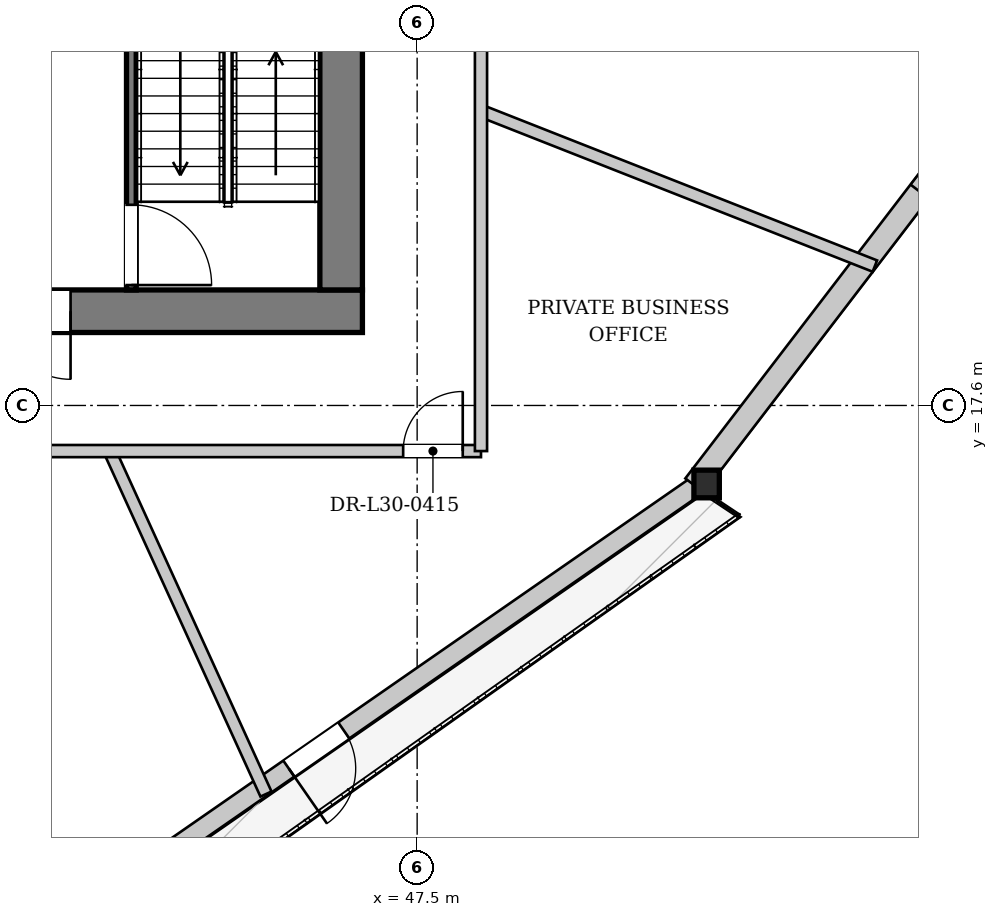
"""IFC4 building model, lengths in metres.
Left out: names, types, materials, properties, quantities, classifications, styles, units other than length and angle.
Written with IfcOpenShell. Run it as: python <this file> out.ifc"""

import sys

from ifc_helpers import new_model, si_unit, direction, frame, frame_2d, origin, origin_2d, place, context, subcontext, project, spatial, rectangle, i_section, extrude, source, transform, mapped, element, fill, save


model = new_model("IFC4")
c1 = context("Model", 3, precision=1e-05, world=origin(), true_north=direction((0.0, 1.0)))
c2 = subcontext(c1, "Body", "Model", "MODEL_VIEW")
j1 = project(units=[si_unit("LENGTHUNIT", "METRE"), si_unit("PLANEANGLEUNIT", "RADIAN")], contexts=[c1])
p1 = place(None, origin())
s1 = spatial("IfcSite", under=j1, at=p1, CompositionType="ELEMENT")
p2 = place(p1, origin())
s2 = spatial("IfcBuilding", under=s1, at=p2, CompositionType="ELEMENT")
p3 = place(p2, frame((0.0, 0.0, 116.35)))
s3 = spatial("IfcBuildingStorey", under=s2, at=p3, CompositionType="ELEMENT", Elevation=116.35)
m1 = source(origin(), c2, "Body", "SweptSolid", [
    extrude(i_section(OverallWidth=0.418, OverallDepth=0.455, WebThickness=0.038, FlangeThickness=0.059, at=origin_2d()), origin(), (0.0, 0.0, 1.0), 3.398),
])
p4 = place(p3, frame((52.212, 16.169, 0.0), z_axis=(0.02845253768, 0.08233991965, 0.996198068022), x_axis=(-0.945162434362, 0.326600631769, 0.0)))
e1 = element("IfcColumn", 1, at=p4, inside=s3, PredefinedType="COLUMN", context=c2, shape_type="MappedRepresentation", body=[
    mapped(m1, transform((0.0, 0.0, 0.0), x_axis=(1.0, 0.0, 0.0), y_axis=(0.0, 1.0, 0.0), z_axis=(0.0, 0.0, 1.0), scale=1.0)),
])
p5 = place(p3, frame((52.121, 16.301, 0.0), z_axis=(0.0, 0.0, 1.0), x_axis=(-0.821520503946, -0.570178973303, 0.0)))
e2 = element("IfcWall", 2, at=p5, inside=s3, PredefinedType="SOLIDWALL", context=c2, shape_type="SweptSolid", body=[
    extrude(rectangle(XDim=23.887, YDim=0.32, at=frame_2d((11.944, 0.0))), origin(), (0.0, 0.0, 1.0), 2.692),
])
p6 = place(p5, frame((7.094, 0.0, 0.0)))
e3 = element("IfcOpeningElement", 3, at=p6, cuts=e2, PredefinedType="OPENING", context=c2, shape_type="SweptSolid", body=[
    extrude(rectangle(XDim=1.1, YDim=2.3, at=frame_2d((0.55, 1.15))), frame((0.0, 0.17, 0.0), z_axis=(0.0, -1.0, 0.0), x_axis=(1.0, 0.0, 0.0)), (0.0, 0.0, 1.0), 0.34),
])
p7 = place(p5, frame((16.777, 0.0, 0.372)))
e4 = element("IfcOpeningElement", 4, at=p7, cuts=e2, PredefinedType="OPENING", context=c2, shape_type="SweptSolid", body=[
    extrude(rectangle(XDim=1.8, YDim=2.2, at=frame_2d((0.9, 1.1))), frame((0.0, 0.17, 0.0), z_axis=(0.0, -1.0, 0.0), x_axis=(1.0, 0.0, 0.0)), (0.0, 0.0, 1.0), 0.34),
])
p8 = place(p3, frame((66.591, 35.245, 0.0), z_axis=(0.0, 0.0, 1.0), x_axis=(-0.608252150968, -0.7937438635, 0.0)))
e5 = element("IfcWall", 5, at=p8, inside=s3, PredefinedType="SOLIDWALL", context=c2, shape_type="SweptSolid", body=[
    extrude(rectangle(XDim=23.887, YDim=0.38, at=frame_2d((11.944, 0.0))), origin(), (0.0, 0.0, 1.0), 2.692),
])
p9 = place(p8, frame((6.088, 0.0, 0.65)))
e6 = element("IfcOpeningElement", 6, at=p9, cuts=e5, PredefinedType="OPENING", context=c2, shape_type="SweptSolid", body=[
    extrude(rectangle(XDim=1.2, YDim=1.5, at=frame_2d((0.6, 0.75))), frame((0.0, 0.2, 0.0), z_axis=(0.0, -1.0, 0.0), x_axis=(1.0, 0.0, 0.0)), (0.0, 0.0, 1.0), 0.4),
])
p10 = place(p8, frame((16.599, 0.0, 0.65)))
e7 = element("IfcOpeningElement", 7, at=p10, cuts=e5, PredefinedType="OPENING", context=c2, shape_type="SweptSolid", body=[
    extrude(rectangle(XDim=1.2, YDim=1.5, at=frame_2d((0.6, 0.75))), frame((0.0, 0.2, 0.0), z_axis=(0.0, -1.0, 0.0), x_axis=(1.0, 0.0, 0.0)), (0.0, 0.0, 1.0), 0.4),
])
p11 = place(p3, frame((46.6, 19.15, 0.0), z_axis=(0.0, 0.0, 1.0), x_axis=(-1.0, 0.0, 0.0)))
e8 = element("IfcWall", 8, at=p11, inside=s3, PredefinedType="SHEAR", context=c2, shape_type="SweptSolid", body=[
    extrude(rectangle(XDim=17.2, YDim=0.7, at=frame_2d((8.6, 0.0))), origin(), (0.0, 0.0, 1.0), 3.3),
])
p12 = place(p11, frame((4.8, 0.0, 0.0)))
e9 = element("IfcOpeningElement", 9, at=p12, cuts=e8, PredefinedType="OPENING", context=c2, shape_type="SweptSolid", body=[
    extrude(rectangle(XDim=1.12, YDim=2.25, at=frame_2d((0.56, 1.125))), frame((0.0, 0.36, 0.0), z_axis=(0.0, -1.0, 0.0), x_axis=(1.0, 0.0, 0.0)), (0.0, 0.0, 1.0), 0.72),
])
p13 = place(p11, frame((11.3, 0.0, 0.0)))
e10 = element("IfcOpeningElement", 10, at=p13, cuts=e8, PredefinedType="OPENING", context=c2, shape_type="SweptSolid", body=[
    extrude(rectangle(XDim=1.12, YDim=2.25, at=frame_2d((0.56, 1.125))), frame((0.0, 0.36, 0.0), z_axis=(0.0, -1.0, 0.0), x_axis=(1.0, 0.0, 0.0)), (0.0, 0.0, 1.0), 0.72),
])
p14 = place(p3, frame((46.25, 33.7, 0.0), z_axis=(0.0, 0.0, 1.0), x_axis=(0.0, -1.0, 0.0)))
e11 = element("IfcWall", 11, at=p14, inside=s3, PredefinedType="SHEAR", context=c2, shape_type="SweptSolid", body=[
    extrude(rectangle(XDim=14.2, YDim=0.7, at=frame_2d((7.1, 0.0))), origin(), (0.0, 0.0, 1.0), 3.3),
])
p15 = place(p14, frame((5.18, 0.0, 0.0)))
e12 = element("IfcOpeningElement", 12, at=p15, cuts=e11, PredefinedType="OPENING", context=c2, shape_type="SweptSolid", body=[
    extrude(rectangle(XDim=1.6, YDim=2.2, at=frame_2d((0.8, 1.1))), frame((0.0, 0.36, 0.0), z_axis=(0.0, -1.0, 0.0), x_axis=(1.0, 0.0, 0.0)), (0.0, 0.0, 1.0), 0.72),
])
p16 = place(p3, frame((42.8, 26.96, 0.0), z_axis=(0.0, 0.0, 1.0), x_axis=(0.0, -1.0, 0.0)))
e13 = element("IfcWall", 13, at=p16, inside=s3, PredefinedType="PARTITIONING", context=c2, shape_type="SweptSolid", body=[
    extrude(rectangle(XDim=7.46, YDim=0.16, at=frame_2d((3.73, 0.0))), origin(), (0.0, 0.0, 1.0), 3.3),
])
p17 = place(p16, frame((6.06, 0.0, 0.0)))
e14 = element("IfcOpeningElement", 14, at=p17, cuts=e13, PredefinedType="OPENING", context=c2, shape_type="SweptSolid", body=[
    extrude(rectangle(XDim=1.32, YDim=2.2, at=frame_2d((0.66, 1.1))), frame((0.0, 0.09, 0.0), z_axis=(0.0, -1.0, 0.0), x_axis=(1.0, 0.0, 0.0)), (0.0, 0.0, 1.0), 0.18),
])
p18 = place(p3, frame((42.443, 16.85, 0.0), z_axis=(0.0, 0.0, 1.0), x_axis=(0.41469000073, -0.909962748301, 0.0)))
e15 = element("IfcWall", 15, at=p18, inside=s3, PredefinedType="PARTITIONING", context=c2, shape_type="SweptSolid", body=[
    extrude(rectangle(XDim=6.199, YDim=0.2, at=frame_2d((3.099, 0.0))), origin(), (0.0, 0.0, 1.0), 3.3),
])
p19 = place(p3, frame((48.55, 22.444, 0.0), z_axis=(0.0, 0.0, 1.0), x_axis=(0.930429770638, -0.366470246964, 0.0)))
e16 = element("IfcWall", 16, at=p19, inside=s3, PredefinedType="PARTITIONING", context=c2, shape_type="SweptSolid", body=[
    extrude(rectangle(XDim=6.962, YDim=0.2, at=frame_2d((3.481, 0.0))), origin(), (0.0, 0.0, 1.0), 3.3),
])
p20 = place(p3, frame((27.45, 16.85, 0.0), z_axis=(0.0, 0.0, 1.0), x_axis=(1.0, 0.0, 0.0)))
e17 = element("IfcWall", 17, at=p20, inside=s3, PredefinedType="PARTITIONING", context=c2, shape_type="SweptSolid", body=[
    extrude(rectangle(XDim=21.1, YDim=0.2, at=frame_2d((10.55, 0.0))), origin(), (0.0, 0.0, 1.0), 3.045),
])
p21 = place(p20, frame((8.224, 0.0, 0.0)))
e18 = element("IfcOpeningElement", 18, at=p21, cuts=e17, PredefinedType="OPENING", context=c2, shape_type="SweptSolid", body=[
    extrude(rectangle(XDim=0.98, YDim=2.15, at=frame_2d((0.49, 1.075))), frame((0.0, 0.11, 0.0), z_axis=(0.0, -1.0, 0.0), x_axis=(1.0, 0.0, 0.0)), (0.0, 0.0, 1.0), 0.22),
])
p22 = place(p20, frame((19.82, 0.0, 0.0)))
e19 = element("IfcOpeningElement", 19, at=p22, cuts=e17, PredefinedType="OPENING", context=c2, shape_type="SweptSolid", body=[
    extrude(rectangle(XDim=0.98, YDim=2.15, at=frame_2d((0.49, 1.075))), frame((0.0, 0.11, 0.0), z_axis=(0.0, -1.0, 0.0), x_axis=(1.0, 0.0, 0.0)), (0.0, 0.0, 1.0), 0.22),
])
p23 = place(p3, frame((48.55, 16.85, 0.0), z_axis=(0.0, 0.0, 1.0), x_axis=(0.0, 1.0, 0.0)))
e20 = element("IfcWall", 20, at=p23, inside=s3, PredefinedType="PARTITIONING", context=c2, shape_type="SweptSolid", body=[
    extrude(rectangle(XDim=19.5, YDim=0.2, at=frame_2d((9.75, 0.0))), origin(), (0.0, 0.0, 1.0), 3.3),
])
p24 = place(p23, frame((9.368, 0.0, 0.0)))
e21 = element("IfcOpeningElement", 21, at=p24, cuts=e20, PredefinedType="OPENING", context=c2, shape_type="SweptSolid", body=[
    extrude(rectangle(XDim=0.98, YDim=2.15, at=frame_2d((0.49, 1.075))), frame((0.0, 0.11, 0.0), z_axis=(0.0, -1.0, 0.0), x_axis=(1.0, 0.0, 0.0)), (0.0, 0.0, 1.0), 0.22),
])
m2 = source(origin(), c2, "Body", "SweptSolid", [
    extrude(rectangle(XDim=1.1, YDim=2.3, at=frame_2d((0.55, 1.15))), frame((0.0, 0.025, 0.0), z_axis=(0.0, -1.0, 0.0), x_axis=(1.0, 0.0, 0.0)), (0.0, 0.0, 1.0), 0.05),
])
p25 = place(p6, origin())
e22 = element("IfcDoor", 22, at=p25, inside=s3, OperationType="SINGLE_SWING_RIGHT", PredefinedType="DOOR", context=c2, shape_type="MappedRepresentation", body=[
    mapped(m2, transform((0.0, 0.0, 0.0), x_axis=(1.0, 0.0, 0.0), y_axis=(0.0, 1.0, 0.0), z_axis=(0.0, 0.0, 1.0), scale=1.0)),
])
fill(e3, e22)
m3 = source(origin(), c2, "Body", "SweptSolid", [
    extrude(rectangle(XDim=1.12, YDim=2.25, at=frame_2d((0.56, 1.125))), frame((0.0, 0.025, 0.0), z_axis=(0.0, -1.0, 0.0), x_axis=(1.0, 0.0, 0.0)), (0.0, 0.0, 1.0), 0.05),
])
p26 = place(p12, origin())
e23 = element("IfcDoor", 23, at=p26, inside=s3, OperationType="SINGLE_SWING_LEFT", PredefinedType="DOOR", context=c2, shape_type="MappedRepresentation", body=[
    mapped(m3, transform((0.0, 0.0, 0.0), x_axis=(1.0, 0.0, 0.0), y_axis=(0.0, 1.0, 0.0), z_axis=(0.0, 0.0, 1.0), scale=1.0)),
])
fill(e9, e23)
m4 = source(origin(), c2, "Body", "SweptSolid", [
    extrude(rectangle(XDim=1.32, YDim=2.2, at=frame_2d((0.66, 1.1))), frame((0.0, 0.025, 0.0), z_axis=(0.0, -1.0, 0.0), x_axis=(1.0, 0.0, 0.0)), (0.0, 0.0, 1.0), 0.05),
])
p27 = place(p17, origin())
e24 = element("IfcDoor", 24, at=p27, inside=s3, OperationType="SINGLE_SWING_RIGHT", PredefinedType="DOOR", context=c2, shape_type="MappedRepresentation", body=[
    mapped(m4, transform((0.0, 0.0, 0.0), x_axis=(1.0, 0.0, 0.0), y_axis=(0.0, 1.0, 0.0), z_axis=(0.0, 0.0, 1.0), scale=1.0)),
])
fill(e14, e24)
m5 = source(origin(), c2, "Body", "SweptSolid", [
    extrude(rectangle(XDim=0.98, YDim=2.15, at=frame_2d((0.49, 1.075))), frame((0.0, 0.025, 0.0), z_axis=(0.0, -1.0, 0.0), x_axis=(1.0, 0.0, 0.0)), (0.0, 0.0, 1.0), 0.05),
])
p28 = place(p22, origin())
e25 = element("IfcDoor", 25, at=p28, inside=s3, OperationType="SINGLE_SWING_RIGHT", PredefinedType="DOOR", context=c2, shape_type="MappedRepresentation", body=[
    mapped(m5, transform((0.0, 0.0, 0.0), x_axis=(1.0, 0.0, 0.0), y_axis=(0.0, 1.0, 0.0), z_axis=(0.0, 0.0, 1.0), scale=1.0)),
])
fill(e19, e25)
save(model, sys.argv[1])
